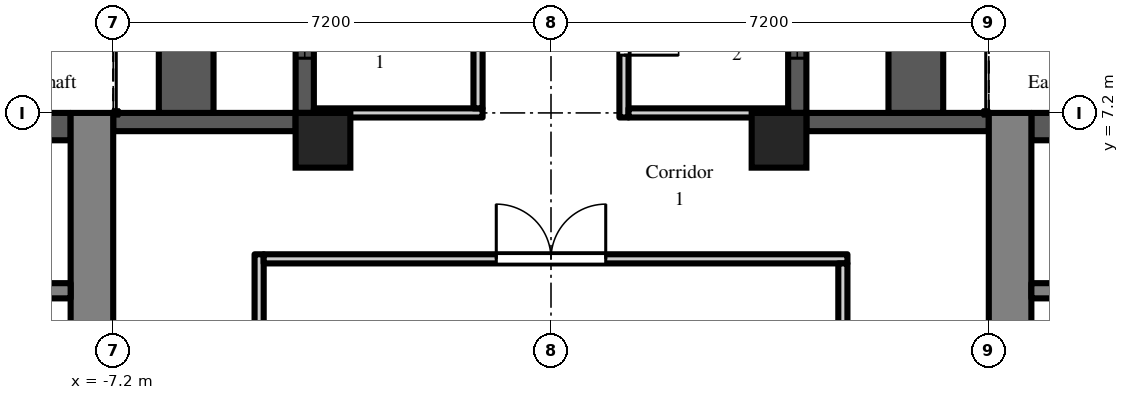
"""IFC4 building model, lengths in metres.
Left out: names, types, materials, properties, quantities, classifications, styles, units other than length and angle.
Written with IfcOpenShell. Run it as: python <this file> out.ifc"""

import sys

from ifc_helpers import new_model, si_unit, direction, frame, frame_2d, origin, origin_2d, place, context, subcontext, project, spatial, rectangle, extrude, element, fill, save


model = new_model("IFC4")
c1 = context("Model", 3, precision=1e-05, world=origin(), true_north=direction((0.0, 1.0)))
c2 = subcontext(c1, "Body", "Model", "MODEL_VIEW")
j1 = project(units=[si_unit("LENGTHUNIT", "METRE"), si_unit("PLANEANGLEUNIT", "RADIAN")], contexts=[c1])
p1 = place(None, origin())
s1 = spatial("IfcSite", under=j1, at=p1, CompositionType="ELEMENT")
p2 = place(p1, origin())
s2 = spatial("IfcBuilding", under=s1, at=p2, CompositionType="ELEMENT")
p3 = place(p2, frame((0.0, 0.0, 120.3)))
s3 = spatial("IfcBuildingStorey", under=s2, at=p3, CompositionType="ELEMENT", Elevation=120.3)
for number, where, z_axis, x_axis in (
    (1, (-3.75, 6.75, 0.0), (0.0, 0.0, 1.0), (1.0, 0.0, 0.0)),
    (2, (3.75, 6.75, 0.0), (0.0, 0.0, 1.0), (1.0, 0.0, 0.0)),
):
    element("IfcColumn", number, at=place(p3, frame(where, z_axis=z_axis, x_axis=x_axis)), inside=s3, PredefinedType="COLUMN", context=c2, shape_type="SweptSolid", body=[
        extrude(rectangle(XDim=0.9, YDim=0.9, at=origin_2d()), origin(), (0.0, 0.0, 1.0), 3.0),
    ])
p4 = place(p3, frame((7.2, 7.05, 0.0), z_axis=(0.0, 0.0, 1.0), x_axis=(-1.0, 0.0, 0.0)))
e3 = element("IfcWall", 3, at=p4, inside=s3, PredefinedType="SOLIDWALL", context=c2, shape_type="SweptSolid", body=[
    extrude(rectangle(XDim=3.0, YDim=0.3, at=frame_2d((1.5, 0.0))), origin(), (0.0, 0.0, 1.0), 2.2),
])
p5 = place(p3, frame((4.05, 7.2, 0.0), z_axis=(0.0, 0.0, 1.0), x_axis=(0.0, 1.0, 0.0)))
e4 = element("IfcWall", 4, at=p5, inside=s3, PredefinedType="SOLIDWALL", context=c2, shape_type="SweptSolid", body=[
    extrude(rectangle(XDim=7.2, YDim=0.3, at=frame_2d((3.6, 0.0))), origin(), (0.0, 0.0, 1.0), 2.2),
])
p6 = place(p5, frame((3.0, 0.0, 0.0)))
e5 = element("IfcOpeningElement", 5, at=p6, cuts=e4, PredefinedType="OPENING", context=c2, shape_type="SweptSolid", body=[
    extrude(rectangle(XDim=1.2, YDim=2.05, at=frame_2d((0.6, 1.025))), frame((0.0, 0.16, 0.0), z_axis=(0.0, -1.0, 0.0), x_axis=(1.0, 0.0, 0.0)), (0.0, 0.0, 1.0), 0.32),
])
p7 = place(p5, frame((0.9, 0.0, 0.2)))
e6 = element("IfcOpeningElement", 6, at=p7, cuts=e4, PredefinedType="OPENING", context=c2, shape_type="SweptSolid", body=[
    extrude(rectangle(XDim=1.8, YDim=1.85, at=frame_2d((0.9, 0.925))), frame((0.0, 0.16, 0.0), z_axis=(0.0, -1.0, 0.0), x_axis=(1.0, 0.0, 0.0)), (0.0, 0.0, 1.0), 0.32),
])
p8 = place(p5, frame((4.5, 0.0, 0.2)))
e7 = element("IfcOpeningElement", 7, at=p8, cuts=e4, PredefinedType="OPENING", context=c2, shape_type="SweptSolid", body=[
    extrude(rectangle(XDim=1.8, YDim=1.85, at=frame_2d((0.9, 0.925))), frame((0.0, 0.16, 0.0), z_axis=(0.0, -1.0, 0.0), x_axis=(1.0, 0.0, 0.0)), (0.0, 0.0, 1.0), 0.32),
])
p9 = place(p3, frame((-4.05, 14.4, 0.0), z_axis=(0.0, 0.0, 1.0), x_axis=(0.0, -1.0, 0.0)))
e8 = element("IfcWall", 8, at=p9, inside=s3, PredefinedType="SOLIDWALL", context=c2, shape_type="SweptSolid", body=[
    extrude(rectangle(XDim=7.2, YDim=0.3, at=frame_2d((3.6, 0.0))), origin(), (0.0, 0.0, 1.0), 2.2),
])
p10 = place(p9, frame((3.0, 0.0, 0.0)))
e9 = element("IfcOpeningElement", 9, at=p10, cuts=e8, PredefinedType="OPENING", context=c2, shape_type="SweptSolid", body=[
    extrude(rectangle(XDim=1.2, YDim=2.05, at=frame_2d((0.6, 1.025))), frame((0.0, 0.16, 0.0), z_axis=(0.0, -1.0, 0.0), x_axis=(1.0, 0.0, 0.0)), (0.0, 0.0, 1.0), 0.32),
])
p11 = place(p9, frame((0.9, 0.0, 0.2)))
e10 = element("IfcOpeningElement", 10, at=p11, cuts=e8, PredefinedType="OPENING", context=c2, shape_type="SweptSolid", body=[
    extrude(rectangle(XDim=1.8, YDim=1.85, at=frame_2d((0.9, 0.925))), frame((0.0, 0.16, 0.0), z_axis=(0.0, -1.0, 0.0), x_axis=(1.0, 0.0, 0.0)), (0.0, 0.0, 1.0), 0.32),
])
p12 = place(p9, frame((4.5, 0.0, 0.2)))
e11 = element("IfcOpeningElement", 11, at=p12, cuts=e8, PredefinedType="OPENING", context=c2, shape_type="SweptSolid", body=[
    extrude(rectangle(XDim=1.8, YDim=1.85, at=frame_2d((0.9, 0.925))), frame((0.0, 0.16, 0.0), z_axis=(0.0, -1.0, 0.0), x_axis=(1.0, 0.0, 0.0)), (0.0, 0.0, 1.0), 0.32),
])
p13 = place(p3, frame((-4.2, 7.05, 0.0), z_axis=(0.0, 0.0, 1.0), x_axis=(-1.0, 0.0, 0.0)))
e12 = element("IfcWall", 12, at=p13, inside=s3, PredefinedType="SOLIDWALL", context=c2, shape_type="SweptSolid", body=[
    extrude(rectangle(XDim=3.0, YDim=0.3, at=frame_2d((1.5, 0.0))), origin(), (0.0, 0.0, 1.0), 2.2),
])
for number, where, z_axis, x_axis in (
    (13, (6.0, 7.2, 0.0), (0.0, 0.0, 1.0), (0.0, 1.0, 0.0)),
    (14, (-6.0, 7.2, 0.0), (0.0, 0.0, 1.0), (0.0, 1.0, 0.0)),
):
    element("IfcWall", number, at=place(p3, frame(where, z_axis=z_axis, x_axis=x_axis)), inside=s3, PredefinedType="PARAPET", context=c2, shape_type="SweptSolid", body=[
        extrude(rectangle(XDim=7.2, YDim=0.9, at=frame_2d((3.6, 0.0))), origin(), (0.0, 0.0, 1.0), 0.8),
    ])
p14 = place(p3, frame((7.55, -7.2, 0.0), z_axis=(0.0, 0.0, 1.0), x_axis=(0.0, 1.0, 0.0)))
e15 = element("IfcWall", 15, at=p14, inside=s3, PredefinedType="SHEAR", context=c2, shape_type="SweptSolid", body=[
    extrude(rectangle(XDim=14.4, YDim=0.7, at=frame_2d((7.2, 0.0))), origin(), (0.0, 0.0, 1.0), 2.6),
])
p15 = place(p14, frame((6.0, 0.0, 0.0)))
e16 = element("IfcOpeningElement", 16, at=p15, cuts=e15, PredefinedType="OPENING", context=c2, shape_type="SweptSolid", body=[
    extrude(rectangle(XDim=2.4, YDim=2.2, at=frame_2d((1.2, 1.1))), frame((0.0, 0.36, 0.0), z_axis=(0.0, -1.0, 0.0), x_axis=(1.0, 0.0, 0.0)), (0.0, 0.0, 1.0), 0.72),
])
p16 = place(p3, frame((7.9, 6.975, 0.0), z_axis=(0.0, 0.0, 1.0), x_axis=(1.0, 0.0, 0.0)))
e17 = element("IfcWall", 17, at=p16, inside=s3, PredefinedType="SHEAR", context=c2, shape_type="SweptSolid", body=[
    extrude(rectangle(XDim=12.95, YDim=0.45, at=frame_2d((6.475, 0.0))), origin(), (0.0, 0.0, 1.0), 2.6),
])
p17 = place(p3, frame((7.9, 4.275, 0.0), z_axis=(0.0, 0.0, 1.0), x_axis=(1.0, 0.0, 0.0)))
e18 = element("IfcWall", 18, at=p17, inside=s3, PredefinedType="SHEAR", context=c2, shape_type="SweptSolid", body=[
    extrude(rectangle(XDim=1.95, YDim=0.25, at=frame_2d((0.975, 0.0))), origin(), (0.0, 0.0, 1.0), 2.6),
])
p18 = place(p3, frame((-7.55, -7.2, 0.0), z_axis=(0.0, 0.0, 1.0), x_axis=(0.0, 1.0, 0.0)))
e19 = element("IfcWall", 19, at=p18, inside=s3, PredefinedType="SHEAR", context=c2, shape_type="SweptSolid", body=[
    extrude(rectangle(XDim=14.4, YDim=0.7, at=frame_2d((7.2, 0.0))), origin(), (0.0, 0.0, 1.0), 2.6),
])
p19 = place(p18, frame((6.0, 0.0, 0.0)))
e20 = element("IfcOpeningElement", 20, at=p19, cuts=e19, PredefinedType="OPENING", context=c2, shape_type="SweptSolid", body=[
    extrude(rectangle(XDim=2.4, YDim=2.2, at=frame_2d((1.2, 1.1))), frame((0.0, 0.36, 0.0), z_axis=(0.0, -1.0, 0.0), x_axis=(1.0, 0.0, 0.0)), (0.0, 0.0, 1.0), 0.72),
])
p20 = place(p3, frame((-7.9, 6.975, 0.0), z_axis=(0.0, 0.0, 1.0), x_axis=(-1.0, 0.0, 0.0)))
e21 = element("IfcWall", 21, at=p20, inside=s3, PredefinedType="SHEAR", context=c2, shape_type="SweptSolid", body=[
    extrude(rectangle(XDim=12.95, YDim=0.45, at=frame_2d((6.475, 0.0))), origin(), (0.0, 0.0, 1.0), 2.6),
])
p21 = place(p3, frame((-7.9, 4.275, 0.0), z_axis=(0.0, 0.0, 1.0), x_axis=(-1.0, 0.0, 0.0)))
e22 = element("IfcWall", 22, at=p21, inside=s3, PredefinedType="SHEAR", context=c2, shape_type="SweptSolid", body=[
    extrude(rectangle(XDim=1.95, YDim=0.25, at=frame_2d((0.975, 0.0))), origin(), (0.0, 0.0, 1.0), 2.6),
])
p22 = place(p3, frame((-4.8, -4.875, 0.0), z_axis=(0.0, 0.0, 1.0), x_axis=(0.0, 1.0, 0.0)))
e23 = element("IfcWall", 23, at=p22, inside=s3, PredefinedType="PARTITIONING", context=c2, shape_type="SweptSolid", body=[
    extrude(rectangle(XDim=9.75, YDim=0.15, at=frame_2d((4.875, 0.0))), origin(), (0.0, 0.0, 1.0), 2.6),
])
p23 = place(p3, frame((-4.725, 4.8, 0.0), z_axis=(0.0, 0.0, 1.0), x_axis=(1.0, 0.0, 0.0)))
e24 = element("IfcWall", 24, at=p23, inside=s3, PredefinedType="PARTITIONING", context=c2, shape_type="SweptSolid", body=[
    extrude(rectangle(XDim=9.6, YDim=0.15, at=frame_2d((4.8, 0.0))), origin(), (0.0, 0.0, 1.0), 2.6),
])
p24 = place(p23, frame((3.825, 0.0, 0.0)))
e25 = element("IfcOpeningElement", 25, at=p24, cuts=e24, PredefinedType="OPENING", context=c2, shape_type="SweptSolid", body=[
    extrude(rectangle(XDim=1.8, YDim=2.1, at=frame_2d((0.9, 1.05))), frame((0.0, 0.085, 0.0), z_axis=(0.0, -1.0, 0.0), x_axis=(1.0, 0.0, 0.0)), (0.0, 0.0, 1.0), 0.17),
])
p25 = place(p3, frame((-3.9, 7.2, 0.0), z_axis=(0.0, 0.0, 1.0), x_axis=(1.0, 0.0, 0.0)))
e26 = element("IfcWall", 26, at=p25, inside=s3, PredefinedType="PARTITIONING", context=c2, shape_type="SweptSolid", body=[
    extrude(rectangle(XDim=2.775, YDim=0.15, at=frame_2d((1.387, 0.0))), origin(), (0.0, 0.0, 1.0), 2.6),
])
p26 = place(p3, frame((-1.2, 7.275, 0.0), z_axis=(0.0, 0.0, 1.0), x_axis=(0.0, 1.0, 0.0)))
e27 = element("IfcWall", 27, at=p26, inside=s3, PredefinedType="PARTITIONING", context=c2, shape_type="SweptSolid", body=[
    extrude(rectangle(XDim=14.025, YDim=0.15, at=frame_2d((7.013, 0.0))), origin(), (0.0, 0.0, 1.0), 2.6),
])
p27 = place(p26, frame((4.875, 0.0, 0.0)))
e28 = element("IfcOpeningElement", 28, at=p27, cuts=e27, PredefinedType="OPENING", context=c2, shape_type="SweptSolid", body=[
    extrude(rectangle(XDim=0.9, YDim=2.1, at=frame_2d((0.45, 1.05))), frame((0.0, 0.085, 0.0), z_axis=(0.0, -1.0, 0.0), x_axis=(1.0, 0.0, 0.0)), (0.0, 0.0, 1.0), 0.17),
])
p28 = place(p26, frame((7.725, 0.0, 0.0)))
e29 = element("IfcOpeningElement", 29, at=p28, cuts=e27, PredefinedType="OPENING", context=c2, shape_type="SweptSolid", body=[
    extrude(rectangle(XDim=1.0, YDim=2.1, at=frame_2d((0.5, 1.05))), frame((0.0, 0.085, 0.0), z_axis=(0.0, -1.0, 0.0), x_axis=(1.0, 0.0, 0.0)), (0.0, 0.0, 1.0), 0.17),
])
p29 = place(p26, frame((11.925, 0.0, 0.0)))
e30 = element("IfcOpeningElement", 30, at=p29, cuts=e27, PredefinedType="OPENING", context=c2, shape_type="SweptSolid", body=[
    extrude(rectangle(XDim=0.9, YDim=2.1, at=frame_2d((0.45, 1.05))), frame((0.0, 0.085, 0.0), z_axis=(0.0, -1.0, 0.0), x_axis=(1.0, 0.0, 0.0)), (0.0, 0.0, 1.0), 0.17),
])
p30 = place(p3, frame((1.2, 7.125, 0.0), z_axis=(0.0, 0.0, 1.0), x_axis=(0.0, 1.0, 0.0)))
e31 = element("IfcWall", 31, at=p30, inside=s3, PredefinedType="PARTITIONING", context=c2, shape_type="SweptSolid", body=[
    extrude(rectangle(XDim=14.175, YDim=0.15, at=frame_2d((7.087, 0.0))), origin(), (0.0, 0.0, 1.0), 2.6),
])
p31 = place(p30, frame((1.025, 0.0, 0.0)))
e32 = element("IfcOpeningElement", 32, at=p31, cuts=e31, PredefinedType="OPENING", context=c2, shape_type="SweptSolid", body=[
    extrude(rectangle(XDim=0.9, YDim=2.1, at=frame_2d((0.45, 1.05))), frame((0.0, 0.085, 0.0), z_axis=(0.0, -1.0, 0.0), x_axis=(1.0, 0.0, 0.0)), (0.0, 0.0, 1.0), 0.17),
])
p32 = place(p30, frame((4.625, 0.0, 0.0)))
e33 = element("IfcOpeningElement", 33, at=p32, cuts=e31, PredefinedType="OPENING", context=c2, shape_type="SweptSolid", body=[
    extrude(rectangle(XDim=0.9, YDim=2.1, at=frame_2d((0.45, 1.05))), frame((0.0, 0.085, 0.0), z_axis=(0.0, -1.0, 0.0), x_axis=(1.0, 0.0, 0.0)), (0.0, 0.0, 1.0), 0.17),
])
p33 = place(p30, frame((7.725, 0.0, 0.0)))
e34 = element("IfcOpeningElement", 34, at=p33, cuts=e31, PredefinedType="OPENING", context=c2, shape_type="SweptSolid", body=[
    extrude(rectangle(XDim=0.9, YDim=2.1, at=frame_2d((0.45, 1.05))), frame((0.0, 0.085, 0.0), z_axis=(0.0, -1.0, 0.0), x_axis=(1.0, 0.0, 0.0)), (0.0, 0.0, 1.0), 0.17),
])
p34 = place(p30, frame((9.525, 0.0, 0.0)))
e35 = element("IfcOpeningElement", 35, at=p34, cuts=e31, PredefinedType="OPENING", context=c2, shape_type="SweptSolid", body=[
    extrude(rectangle(XDim=0.9, YDim=2.1, at=frame_2d((0.45, 1.05))), frame((0.0, 0.085, 0.0), z_axis=(0.0, -1.0, 0.0), x_axis=(1.0, 0.0, 0.0)), (0.0, 0.0, 1.0), 0.17),
])
p35 = place(p30, frame((12.075, 0.0, 0.0)))
e36 = element("IfcOpeningElement", 36, at=p35, cuts=e31, PredefinedType="OPENING", context=c2, shape_type="SweptSolid", body=[
    extrude(rectangle(XDim=0.9, YDim=2.1, at=frame_2d((0.45, 1.05))), frame((0.0, 0.085, 0.0), z_axis=(0.0, -1.0, 0.0), x_axis=(1.0, 0.0, 0.0)), (0.0, 0.0, 1.0), 0.17),
])
p36 = place(p3, frame((1.275, 7.2, 0.0), z_axis=(0.0, 0.0, 1.0), x_axis=(1.0, 0.0, 0.0)))
e37 = element("IfcWall", 37, at=p36, inside=s3, PredefinedType="PARTITIONING", context=c2, shape_type="SweptSolid", body=[
    extrude(rectangle(XDim=2.625, YDim=0.15, at=frame_2d((1.312, 0.0))), origin(), (0.0, 0.0, 1.0), 2.6),
])
p37 = place(p3, frame((4.8, -4.725, 0.0), z_axis=(0.0, 0.0, 1.0), x_axis=(0.0, 1.0, 0.0)))
e38 = element("IfcWall", 38, at=p37, inside=s3, PredefinedType="PARTITIONING", context=c2, shape_type="SweptSolid", body=[
    extrude(rectangle(XDim=9.45, YDim=0.15, at=frame_2d((4.725, 0.0))), origin(), (0.0, 0.0, 1.0), 2.6),
])
p38 = place(p7, origin())
e39 = element("IfcWindow", 39, at=p38, inside=s3, PartitioningType="SINGLE_PANEL", PredefinedType="WINDOW", context=c2, shape_type="SweptSolid", body=[
    extrude(rectangle(XDim=1.8, YDim=1.85, at=frame_2d((0.9, 0.925))), frame((0.0, 0.03, 0.0), z_axis=(0.0, -1.0, 0.0), x_axis=(1.0, 0.0, 0.0)), (0.0, 0.0, 1.0), 0.06),
])
fill(e6, e39)
p39 = place(p12, origin())
e40 = element("IfcWindow", 40, at=p39, inside=s3, PartitioningType="SINGLE_PANEL", PredefinedType="WINDOW", context=c2, shape_type="SweptSolid", body=[
    extrude(rectangle(XDim=1.8, YDim=1.85, at=frame_2d((0.9, 0.925))), frame((0.0, 0.03, 0.0), z_axis=(0.0, -1.0, 0.0), x_axis=(1.0, 0.0, 0.0)), (0.0, 0.0, 1.0), 0.06),
])
fill(e11, e40)
p40 = place(p24, origin())
e41 = element("IfcDoor", 41, at=p40, inside=s3, OperationType="DOUBLE_DOOR_DOUBLE_SWING", PredefinedType="DOOR", context=c2, shape_type="SweptSolid", body=[
    extrude(rectangle(XDim=1.8, YDim=2.1, at=frame_2d((0.9, 1.05))), frame((0.0, 0.025, 0.0), z_axis=(0.0, -1.0, 0.0), x_axis=(1.0, 0.0, 0.0)), (0.0, 0.0, 1.0), 0.05),
])
fill(e25, e41)
p41 = place(p31, frame((0.9, 0.0, 0.0), z_axis=(0.0, 0.0, 1.0), x_axis=(-1.0, 0.0, 0.0)))
e42 = element("IfcDoor", 42, at=p41, inside=s3, OperationType="SINGLE_SWING_RIGHT", PredefinedType="DOOR", context=c2, shape_type="SweptSolid", body=[
    extrude(rectangle(XDim=0.9, YDim=2.1, at=frame_2d((0.45, 1.05))), frame((0.0, 0.025, 0.0), z_axis=(0.0, -1.0, 0.0), x_axis=(1.0, 0.0, 0.0)), (0.0, 0.0, 1.0), 0.05),
])
fill(e32, e42)
save(model, sys.argv[1])
